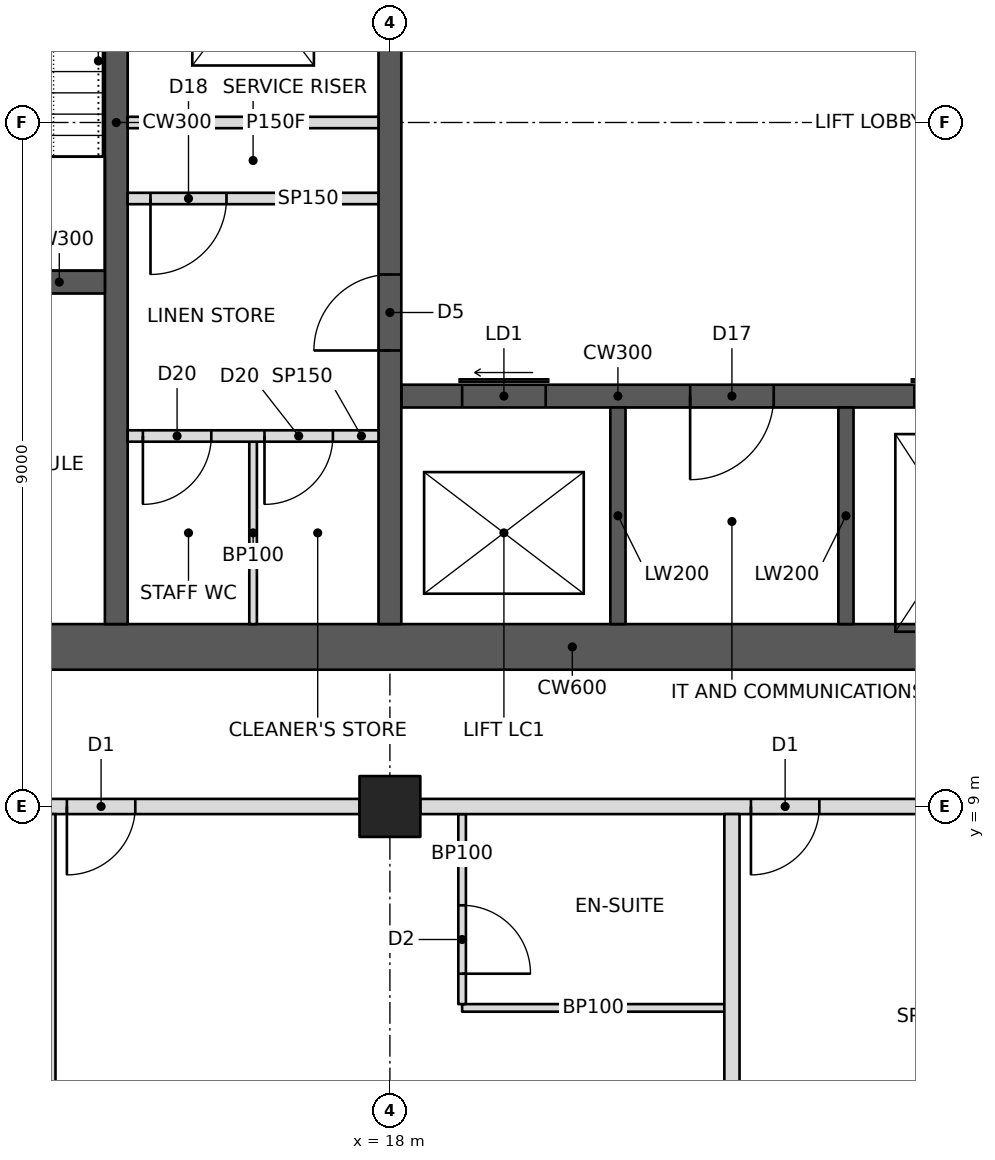
"""IFC4 building model, lengths in metres.
Left out: names, types, materials, properties, quantities, classifications, styles, units other than length and angle.
Written with IfcOpenShell. Run it as: python <this file> out.ifc"""

import sys

from ifc_helpers import new_model, si_unit, direction, frame, frame_2d, origin, origin_2d, place, context, subcontext, project, spatial, rectangle, hollow_rectangle, extrude, element, fill, save


model = new_model("IFC4")
c1 = context("Model", 3, precision=1e-05, world=origin(), true_north=direction((0.0, 1.0)))
c2 = subcontext(c1, "Body", "Model", "MODEL_VIEW")
j1 = project(units=[si_unit("LENGTHUNIT", "METRE"), si_unit("PLANEANGLEUNIT", "RADIAN")], contexts=[c1])
p1 = place(None, origin())
s1 = spatial("IfcSite", under=j1, at=p1, CompositionType="ELEMENT")
p2 = place(p1, origin())
s2 = spatial("IfcBuilding", under=s1, at=p2, CompositionType="ELEMENT")
p3 = place(p2, frame((0.0, 0.0, 204.6)))
s3 = spatial("IfcBuildingStorey", under=s2, at=p3, CompositionType="ELEMENT", Elevation=204.6)
p4 = place(p3, frame((18.0, 9.0, 0.0), z_axis=(0.0, 0.0, 1.0), x_axis=(1.0, 0.0, 0.0)))
e1 = element("IfcColumn", 1, at=p4, inside=s3, PredefinedType="COLUMN", context=c2, shape_type="SweptSolid", body=[
    extrude(hollow_rectangle(XDim=0.8, YDim=0.8, WallThickness=0.05, at=origin_2d()), origin(), (0.0, 0.0, 1.0), 3.4),
])
p5 = place(p3, frame((10.8, 11.1, 0.0), z_axis=(0.0, 0.0, 1.0), x_axis=(1.0, 0.0, 0.0)))
e2 = element("IfcWall", 2, at=p5, inside=s3, PredefinedType="SHEAR", context=c2, shape_type="SweptSolid", body=[
    extrude(rectangle(XDim=23.4, YDim=0.6, at=frame_2d((11.7, 0.0))), origin(), (0.0, 0.0, 1.0), 3.4),
])
p6 = place(p5, frame((1.0, 0.0, 0.0)))
e3 = element("IfcOpeningElement", 3, at=p6, cuts=e2, PredefinedType="OPENING", context=c2, shape_type="SweptSolid", body=[
    extrude(rectangle(XDim=1.0, YDim=2.1, at=frame_2d((0.5, 1.05))), frame((0.0, 0.31, 0.0), z_axis=(0.0, -1.0, 0.0), x_axis=(1.0, 0.0, 0.0)), (0.0, 0.0, 1.0), 0.62),
])
p7 = place(p5, frame((17.2, 0.0, 0.0)))
e4 = element("IfcOpeningElement", 4, at=p7, cuts=e2, PredefinedType="OPENING", context=c2, shape_type="SweptSolid", body=[
    extrude(rectangle(XDim=1.8, YDim=2.1, at=frame_2d((0.9, 1.05))), frame((0.0, 0.31, 0.0), z_axis=(0.0, -1.0, 0.0), x_axis=(1.0, 0.0, 0.0)), (0.0, 0.0, 1.0), 0.62),
])
p8 = place(p3, frame((14.4, 11.4, 0.0), z_axis=(0.0, 0.0, 1.0), x_axis=(0.0, 1.0, 0.0)))
e5 = element("IfcWall", 5, at=p8, inside=s3, PredefinedType="SHEAR", context=c2, shape_type="SweptSolid", body=[
    extrude(rectangle(XDim=13.2, YDim=0.3, at=frame_2d((6.6, 0.0))), origin(), (0.0, 0.0, 1.0), 3.4),
])
p9 = place(p3, frame((11.4, 15.9, 0.0), z_axis=(0.0, 0.0, 1.0), x_axis=(1.0, 0.0, 0.0)))
e6 = element("IfcWall", 6, at=p9, inside=s3, PredefinedType="SHEAR", context=c2, shape_type="SweptSolid", body=[
    extrude(rectangle(XDim=2.85, YDim=0.3, at=frame_2d((1.425, 0.0))), origin(), (0.0, 0.0, 1.0), 3.4),
])
p10 = place(p9, frame((0.5, 0.0, 0.0)))
e7 = element("IfcOpeningElement", 7, at=p10, cuts=e6, PredefinedType="OPENING", context=c2, shape_type="SweptSolid", body=[
    extrude(rectangle(XDim=1.0, YDim=2.1, at=frame_2d((0.5, 1.05))), frame((0.0, 0.16, 0.0), z_axis=(0.0, -1.0, 0.0), x_axis=(1.0, 0.0, 0.0)), (0.0, 0.0, 1.0), 0.32),
])
p11 = place(p3, frame((18.0, 11.4, 0.0), z_axis=(0.0, 0.0, 1.0), x_axis=(0.0, 1.0, 0.0)))
e8 = element("IfcWall", 8, at=p11, inside=s3, PredefinedType="SHEAR", context=c2, shape_type="SweptSolid", body=[
    extrude(rectangle(XDim=13.2, YDim=0.3, at=frame_2d((6.6, 0.0))), origin(), (0.0, 0.0, 1.0), 3.4),
])
p12 = place(p11, frame((3.6, 0.0, 0.0)))
e9 = element("IfcOpeningElement", 9, at=p12, cuts=e8, PredefinedType="OPENING", context=c2, shape_type="SweptSolid", body=[
    extrude(rectangle(XDim=1.0, YDim=2.1, at=frame_2d((0.5, 1.05))), frame((0.0, 0.16, 0.0), z_axis=(0.0, -1.0, 0.0), x_axis=(1.0, 0.0, 0.0)), (0.0, 0.0, 1.0), 0.32),
])
p13 = place(p11, frame((7.85, 0.0, 0.0)))
e10 = element("IfcOpeningElement", 10, at=p13, cuts=e8, PredefinedType="OPENING", context=c2, shape_type="SweptSolid", body=[
    extrude(rectangle(XDim=1.1, YDim=2.1, at=frame_2d((0.55, 1.05))), frame((0.0, 0.16, 0.0), z_axis=(0.0, -1.0, 0.0), x_axis=(1.0, 0.0, 0.0)), (0.0, 0.0, 1.0), 0.32),
])
p14 = place(p3, frame((14.55, 18.0, 0.0), z_axis=(0.0, 0.0, 1.0), x_axis=(1.0, 0.0, 0.0)))
e11 = element("IfcWall", 11, at=p14, inside=s3, PredefinedType="PARTITIONING", context=c2, shape_type="SweptSolid", body=[
    extrude(rectangle(XDim=3.3, YDim=0.15, at=frame_2d((1.65, 0.0))), origin(), (0.0, 0.0, 1.0), 3.2),
])
p15 = place(p3, frame((18.15, 14.4, 0.0), z_axis=(0.0, 0.0, 1.0), x_axis=(1.0, 0.0, 0.0)))
e12 = element("IfcWall", 12, at=p15, inside=s3, PredefinedType="SHEAR", context=c2, shape_type="SweptSolid", body=[
    extrude(rectangle(XDim=9.0, YDim=0.3, at=frame_2d((4.5, 0.0))), origin(), (0.0, 0.0, 1.0), 3.4),
])
p16 = place(p15, frame((0.8, 0.0, 0.0)))
e13 = element("IfcOpeningElement", 13, at=p16, cuts=e12, PredefinedType="OPENING", context=c2, shape_type="SweptSolid", body=[
    extrude(rectangle(XDim=1.1, YDim=2.1, at=frame_2d((0.55, 1.05))), frame((0.0, 0.16, 0.0), z_axis=(0.0, -1.0, 0.0), x_axis=(1.0, 0.0, 0.0)), (0.0, 0.0, 1.0), 0.32),
])
p17 = place(p15, frame((6.75, 0.0, 0.0)))
e14 = element("IfcOpeningElement", 14, at=p17, cuts=e12, PredefinedType="OPENING", context=c2, shape_type="SweptSolid", body=[
    extrude(rectangle(XDim=1.2, YDim=2.1, at=frame_2d((0.6, 1.05))), frame((0.0, 0.16, 0.0), z_axis=(0.0, -1.0, 0.0), x_axis=(1.0, 0.0, 0.0)), (0.0, 0.0, 1.0), 0.32),
])
p18 = place(p15, frame((3.8, 0.0, 0.0)))
e15 = element("IfcOpeningElement", 15, at=p18, cuts=e12, PredefinedType="OPENING", context=c2, shape_type="SweptSolid", body=[
    extrude(rectangle(XDim=1.1, YDim=2.1, at=frame_2d((0.55, 1.05))), frame((0.0, 0.16, 0.0), z_axis=(0.0, -1.0, 0.0), x_axis=(1.0, 0.0, 0.0)), (0.0, 0.0, 1.0), 0.32),
])
for number, where, z_axis, x_axis in (
    (16, (21.0, 11.4, 0.0), (0.0, 0.0, 1.0), (0.0, 1.0, 0.0)),
    (17, (24.0, 11.4, 0.0), (0.0, 0.0, 1.0), (0.0, 1.0, 0.0)),
):
    element("IfcWall", number, at=place(p3, frame(where, z_axis=z_axis, x_axis=x_axis)), inside=s3, PredefinedType="SHEAR", context=c2, shape_type="SweptSolid", body=[
        extrude(rectangle(XDim=2.85, YDim=0.2, at=frame_2d((1.425, 0.0))), origin(), (0.0, 0.0, 1.0), 3.4),
    ])
p19 = place(p3, frame((9.4, 9.0, 0.0), z_axis=(0.0, 0.0, 1.0), x_axis=(1.0, 0.0, 0.0)))
e18 = element("IfcWall", 18, at=p19, inside=s3, PredefinedType="PARTITIONING", context=c2, shape_type="SweptSolid", body=[
    extrude(rectangle(XDim=8.2, YDim=0.2, at=frame_2d((4.1, 0.0))), origin(), (0.0, 0.0, 1.0), 2.405),
])
p20 = place(p19, frame((2.95, 0.0, 0.0)))
e19 = element("IfcOpeningElement", 19, at=p20, cuts=e18, PredefinedType="OPENING", context=c2, shape_type="SweptSolid", body=[
    extrude(rectangle(XDim=0.9, YDim=2.1, at=frame_2d((0.45, 1.05))), frame((0.0, 0.11, 0.0), z_axis=(0.0, -1.0, 0.0), x_axis=(1.0, 0.0, 0.0)), (0.0, 0.0, 1.0), 0.22),
])
p21 = place(p19, frame((4.35, 0.0, 0.0)))
e20 = element("IfcOpeningElement", 20, at=p21, cuts=e18, PredefinedType="OPENING", context=c2, shape_type="SweptSolid", body=[
    extrude(rectangle(XDim=0.9, YDim=2.1, at=frame_2d((0.45, 1.05))), frame((0.0, 0.11, 0.0), z_axis=(0.0, -1.0, 0.0), x_axis=(1.0, 0.0, 0.0)), (0.0, 0.0, 1.0), 0.22),
])
p22 = place(p3, frame((18.4, 9.0, 0.0), z_axis=(0.0, 0.0, 1.0), x_axis=(1.0, 0.0, 0.0)))
e21 = element("IfcWall", 21, at=p22, inside=s3, PredefinedType="PARTITIONING", context=c2, shape_type="SweptSolid", body=[
    extrude(rectangle(XDim=8.2, YDim=0.2, at=frame_2d((4.1, 0.0))), origin(), (0.0, 0.0, 1.0), 2.405),
])
p23 = place(p22, frame((4.35, 0.0, 0.0)))
e22 = element("IfcOpeningElement", 22, at=p23, cuts=e21, PredefinedType="OPENING", context=c2, shape_type="SweptSolid", body=[
    extrude(rectangle(XDim=0.9, YDim=2.1, at=frame_2d((0.45, 1.05))), frame((0.0, 0.11, 0.0), z_axis=(0.0, -1.0, 0.0), x_axis=(1.0, 0.0, 0.0)), (0.0, 0.0, 1.0), 0.22),
])
for number, where, z_axis, x_axis in (
    (23, (13.5, 8.9, 0.0), (0.0, 0.0, 1.0), (0.0, -1.0, 0.0)),
    (24, (22.5, 8.9, 0.0), (0.0, 0.0, 1.0), (0.0, -1.0, 0.0)),
):
    element("IfcWall", number, at=place(p3, frame(where, z_axis=z_axis, x_axis=x_axis)), inside=s3, PredefinedType="PARTITIONING", context=c2, shape_type="SweptSolid", body=[
        extrude(rectangle(XDim=7.9, YDim=0.2, at=frame_2d((3.95, 0.0))), origin(), (0.0, 0.0, 1.0), 2.404),
    ])
p24 = place(p3, frame((18.95, 6.35, 0.0), z_axis=(0.0, 0.0, 1.0), x_axis=(1.0, 0.0, 0.0)))
e25 = element("IfcWall", 25, at=p24, inside=s3, PredefinedType="PARTITIONING", context=c2, shape_type="SweptSolid", body=[
    extrude(rectangle(XDim=3.45, YDim=0.1, at=frame_2d((1.725, 0.0))), origin(), (0.0, 0.0, 1.0), 3.2),
])
p25 = place(p3, frame((18.95, 8.9, 0.0), z_axis=(0.0, 0.0, 1.0), x_axis=(0.0, -1.0, 0.0)))
e26 = element("IfcWall", 26, at=p25, inside=s3, PredefinedType="PARTITIONING", context=c2, shape_type="SweptSolid", body=[
    extrude(rectangle(XDim=2.5, YDim=0.1, at=frame_2d((1.25, 0.0))), origin(), (0.0, 0.0, 1.0), 2.404),
])
p26 = place(p25, frame((1.2, 0.0, 0.0)))
e27 = element("IfcOpeningElement", 27, at=p26, cuts=e26, PredefinedType="OPENING", context=c2, shape_type="SweptSolid", body=[
    extrude(rectangle(XDim=0.9, YDim=2.1, at=frame_2d((0.45, 1.05))), frame((0.0, 0.06, 0.0), z_axis=(0.0, -1.0, 0.0), x_axis=(1.0, 0.0, 0.0)), (0.0, 0.0, 1.0), 0.12),
])
p27 = place(p3, frame((14.55, 17.0, 0.0), z_axis=(0.0, 0.0, 1.0), x_axis=(1.0, 0.0, 0.0)))
e28 = element("IfcWall", 28, at=p27, inside=s3, PredefinedType="PARTITIONING", context=c2, shape_type="SweptSolid", body=[
    extrude(rectangle(XDim=3.3, YDim=0.15, at=frame_2d((1.65, 0.0))), origin(), (0.0, 0.0, 1.0), 3.2),
])
p28 = place(p27, frame((0.3, 0.0, 0.0)))
e29 = element("IfcOpeningElement", 29, at=p28, cuts=e28, PredefinedType="OPENING", context=c2, shape_type="SweptSolid", body=[
    extrude(rectangle(XDim=1.0, YDim=2.1, at=frame_2d((0.5, 1.05))), frame((0.0, 0.085, 0.0), z_axis=(0.0, -1.0, 0.0), x_axis=(1.0, 0.0, 0.0)), (0.0, 0.0, 1.0), 0.17),
])
p29 = place(p3, frame((14.55, 13.875, 0.0), z_axis=(0.0, 0.0, 1.0), x_axis=(1.0, 0.0, 0.0)))
e30 = element("IfcWall", 30, at=p29, inside=s3, PredefinedType="PARTITIONING", context=c2, shape_type="SweptSolid", body=[
    extrude(rectangle(XDim=3.3, YDim=0.15, at=frame_2d((1.65, 0.0))), origin(), (0.0, 0.0, 1.0), 3.2),
])
p30 = place(p29, frame((0.2, 0.0, 0.0)))
e31 = element("IfcOpeningElement", 31, at=p30, cuts=e30, PredefinedType="OPENING", context=c2, shape_type="SweptSolid", body=[
    extrude(rectangle(XDim=0.9, YDim=2.1, at=frame_2d((0.45, 1.05))), frame((0.0, 0.085, 0.0), z_axis=(0.0, -1.0, 0.0), x_axis=(1.0, 0.0, 0.0)), (0.0, 0.0, 1.0), 0.17),
])
p31 = place(p29, frame((1.8, 0.0, 0.0)))
e32 = element("IfcOpeningElement", 32, at=p31, cuts=e30, PredefinedType="OPENING", context=c2, shape_type="SweptSolid", body=[
    extrude(rectangle(XDim=0.9, YDim=2.1, at=frame_2d((0.45, 1.05))), frame((0.0, 0.085, 0.0), z_axis=(0.0, -1.0, 0.0), x_axis=(1.0, 0.0, 0.0)), (0.0, 0.0, 1.0), 0.17),
])
p32 = place(p3, frame((16.2, 11.4, 0.0), z_axis=(0.0, 0.0, 1.0), x_axis=(0.0, 1.0, 0.0)))
e33 = element("IfcWall", 33, at=p32, inside=s3, PredefinedType="PARTITIONING", context=c2, shape_type="SweptSolid", body=[
    extrude(rectangle(XDim=2.4, YDim=0.1, at=frame_2d((1.2, 0.0))), origin(), (0.0, 0.0, 1.0), 3.2),
])
p33 = place(p26, origin())
e34 = element("IfcDoor", 34, at=p33, inside=s3, OperationType="SINGLE_SWING_RIGHT", PredefinedType="DOOR", context=c2, shape_type="SweptSolid", body=[
    extrude(rectangle(XDim=0.9, YDim=2.1, at=frame_2d((0.45, 1.05))), frame((0.0, 0.025, 0.0), z_axis=(0.0, -1.0, 0.0), x_axis=(1.0, 0.0, 0.0)), (0.0, 0.0, 1.0), 0.05),
])
fill(e27, e34)
p34 = place(p21, frame((0.9, 0.0, 0.0), z_axis=(0.0, 0.0, 1.0), x_axis=(-1.0, 0.0, 0.0)))
e35 = element("IfcDoor", 35, at=p34, inside=s3, OperationType="SINGLE_SWING_RIGHT", PredefinedType="DOOR", context=c2, shape_type="SweptSolid", body=[
    extrude(rectangle(XDim=0.9, YDim=2.1, at=frame_2d((0.45, 1.05))), frame((0.0, 0.025, 0.0), z_axis=(0.0, -1.0, 0.0), x_axis=(1.0, 0.0, 0.0)), (0.0, 0.0, 1.0), 0.05),
])
fill(e20, e35)
p35 = place(p23, frame((0.9, 0.0, 0.0), z_axis=(0.0, 0.0, 1.0), x_axis=(-1.0, 0.0, 0.0)))
e36 = element("IfcDoor", 36, at=p35, inside=s3, OperationType="SINGLE_SWING_RIGHT", PredefinedType="DOOR", context=c2, shape_type="SweptSolid", body=[
    extrude(rectangle(XDim=0.9, YDim=2.1, at=frame_2d((0.45, 1.05))), frame((0.0, 0.025, 0.0), z_axis=(0.0, -1.0, 0.0), x_axis=(1.0, 0.0, 0.0)), (0.0, 0.0, 1.0), 0.05),
])
fill(e22, e36)
p36 = place(p28, frame((1.0, 0.0, 0.0), z_axis=(0.0, 0.0, 1.0), x_axis=(-1.0, 0.0, 0.0)))
e37 = element("IfcDoor", 37, at=p36, inside=s3, OperationType="SINGLE_SWING_RIGHT", PredefinedType="DOOR", context=c2, shape_type="SweptSolid", body=[
    extrude(rectangle(XDim=1.0, YDim=2.1, at=frame_2d((0.5, 1.05))), frame((0.0, 0.025, 0.0), z_axis=(0.0, -1.0, 0.0), x_axis=(1.0, 0.0, 0.0)), (0.0, 0.0, 1.0), 0.05),
])
fill(e29, e37)
p37 = place(p30, frame((0.9, 0.0, 0.0), z_axis=(0.0, 0.0, 1.0), x_axis=(-1.0, 0.0, 0.0)))
e38 = element("IfcDoor", 38, at=p37, inside=s3, OperationType="SINGLE_SWING_RIGHT", PredefinedType="DOOR", context=c2, shape_type="SweptSolid", body=[
    extrude(rectangle(XDim=0.9, YDim=2.1, at=frame_2d((0.45, 1.05))), frame((0.0, 0.025, 0.0), z_axis=(0.0, -1.0, 0.0), x_axis=(1.0, 0.0, 0.0)), (0.0, 0.0, 1.0), 0.05),
])
fill(e31, e38)
p38 = place(p31, frame((0.9, 0.0, 0.0), z_axis=(0.0, 0.0, 1.0), x_axis=(-1.0, 0.0, 0.0)))
e39 = element("IfcDoor", 39, at=p38, inside=s3, OperationType="SINGLE_SWING_RIGHT", PredefinedType="DOOR", context=c2, shape_type="SweptSolid", body=[
    extrude(rectangle(XDim=0.9, YDim=2.1, at=frame_2d((0.45, 1.05))), frame((0.0, 0.025, 0.0), z_axis=(0.0, -1.0, 0.0), x_axis=(1.0, 0.0, 0.0)), (0.0, 0.0, 1.0), 0.05),
])
fill(e32, e39)
p39 = place(p12, origin())
e40 = element("IfcDoor", 40, at=p39, inside=s3, OperationType="SINGLE_SWING_LEFT", PredefinedType="DOOR", context=c2, shape_type="SweptSolid", body=[
    extrude(rectangle(XDim=1.0, YDim=2.1, at=frame_2d((0.5, 1.05))), frame((0.0, 0.025, 0.0), z_axis=(0.0, -1.0, 0.0), x_axis=(1.0, 0.0, 0.0)), (0.0, 0.0, 1.0), 0.05),
])
fill(e9, e40)
p40 = place(p16, origin())
e41 = element("IfcDoor", 41, at=p40, inside=s3, OperationType="SLIDING_TO_LEFT", PredefinedType="DOOR", context=c2, shape_type="SweptSolid", body=[
    extrude(rectangle(XDim=1.1, YDim=2.1, at=frame_2d((0.55, 1.05))), frame((0.0, 0.025, 0.0), z_axis=(0.0, -1.0, 0.0), x_axis=(1.0, 0.0, 0.0)), (0.0, 0.0, 1.0), 0.05),
])
fill(e13, e41)
p41 = place(p18, frame((1.1, 0.0, 0.0), z_axis=(0.0, 0.0, 1.0), x_axis=(-1.0, 0.0, 0.0)))
e42 = element("IfcDoor", 42, at=p41, inside=s3, OperationType="SINGLE_SWING_RIGHT", PredefinedType="DOOR", context=c2, shape_type="SweptSolid", body=[
    extrude(rectangle(XDim=1.1, YDim=2.1, at=frame_2d((0.55, 1.05))), frame((0.0, 0.025, 0.0), z_axis=(0.0, -1.0, 0.0), x_axis=(1.0, 0.0, 0.0)), (0.0, 0.0, 1.0), 0.05),
])
fill(e15, e42)
save(model, sys.argv[1])
